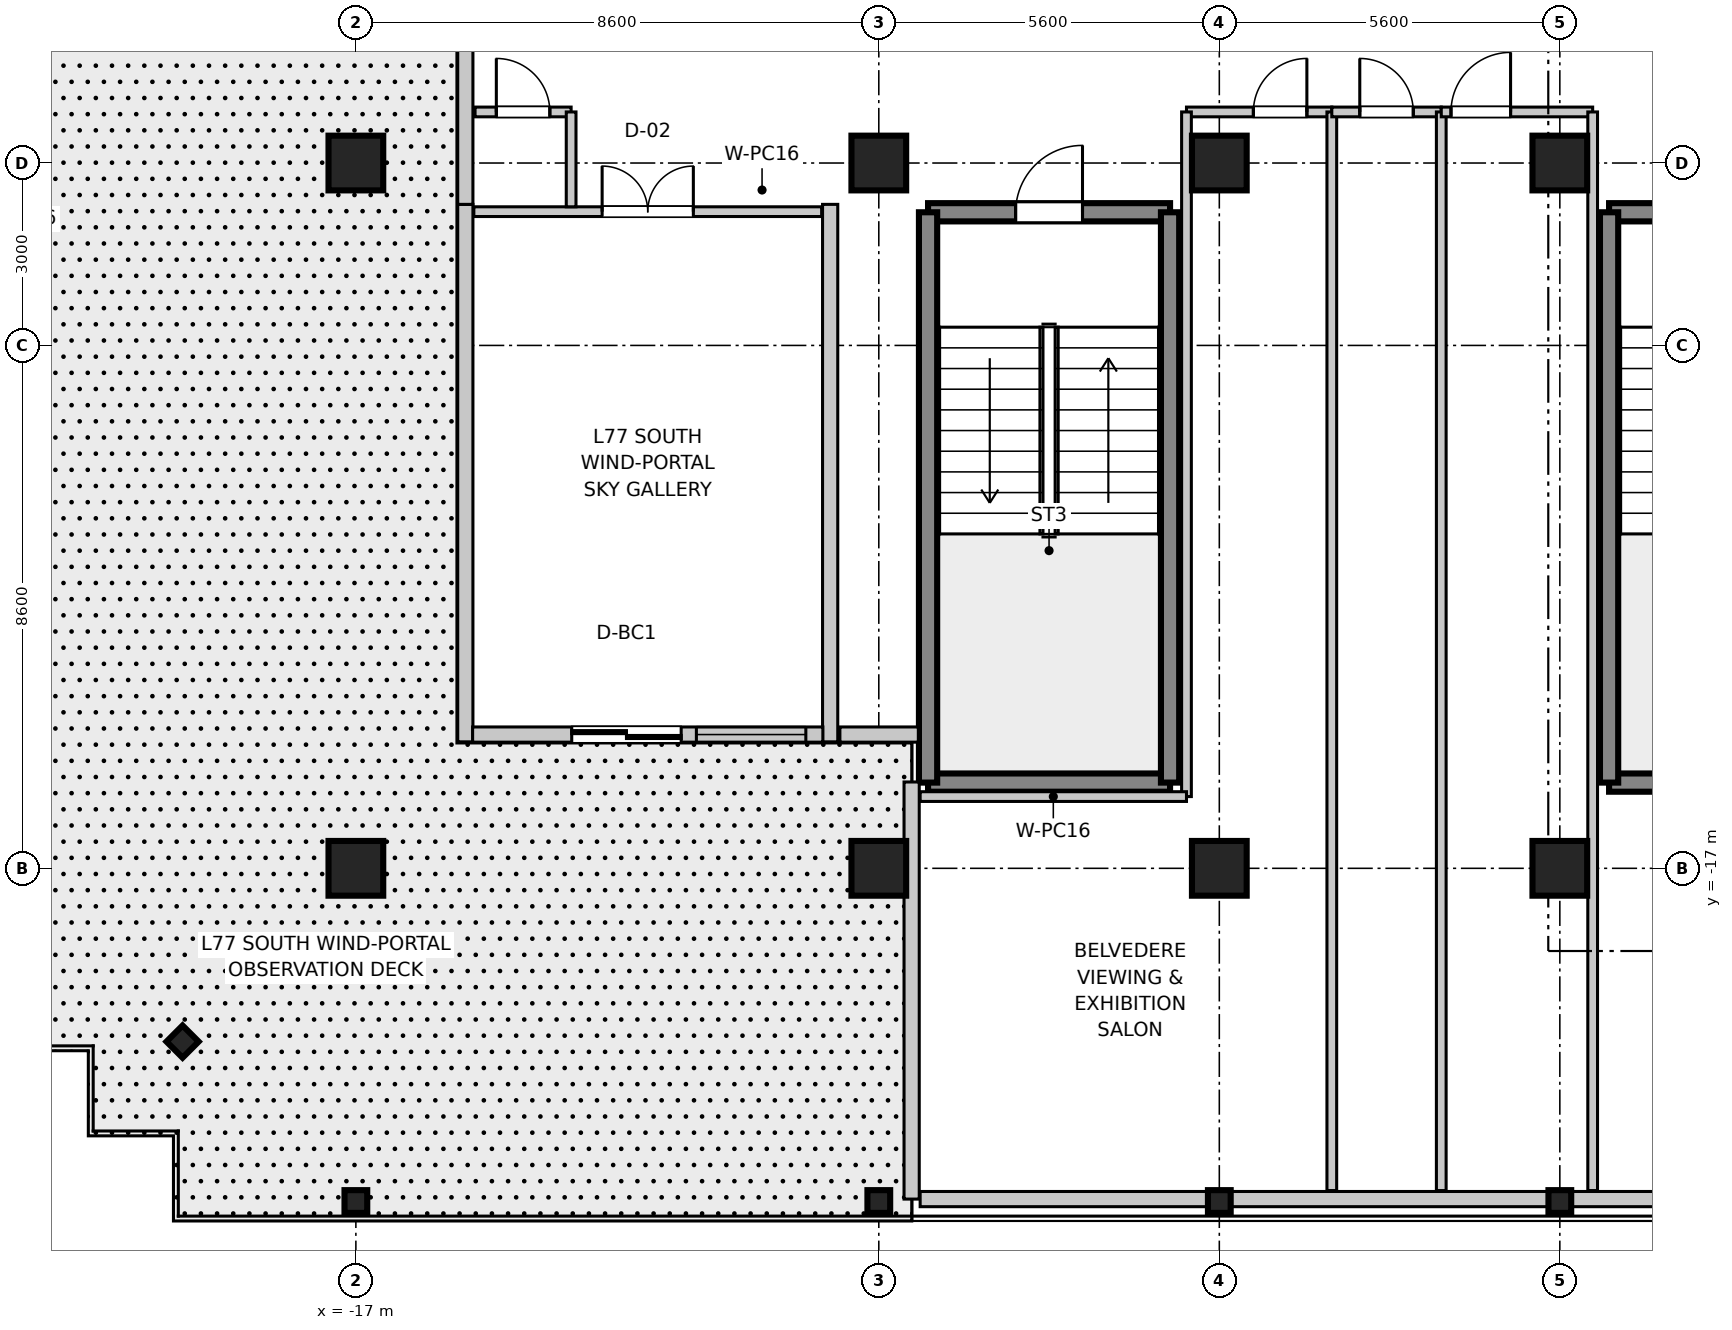
"""IFC4 building model, lengths in metres.
Left out: names, types, materials, properties, quantities, classifications, styles, units other than length and angle.
Written with IfcOpenShell. Run it as: python <this file> out.ifc"""

import sys

from ifc_helpers import new_model, si_unit, direction, frame, frame_2d, origin, origin_2d, place, context, subcontext, project, spatial, rectangle, i_section, extrude, source, transform, mapped, element, fill, save


model = new_model("IFC4")
c1 = context("Model", 3, precision=1e-05, world=origin(), true_north=direction((0.0, 1.0)))
c2 = subcontext(c1, "Body", "Model", "MODEL_VIEW")
j1 = project(units=[si_unit("LENGTHUNIT", "METRE"), si_unit("PLANEANGLEUNIT", "RADIAN")], contexts=[c1])
p1 = place(None, origin())
s1 = spatial("IfcSite", under=j1, at=p1, CompositionType="ELEMENT")
p2 = place(p1, origin())
s2 = spatial("IfcBuilding", under=s1, at=p2, CompositionType="ELEMENT")
p3 = place(p2, frame((0.0, 0.0, 300.35)))
s3 = spatial("IfcBuildingStorey", under=s2, at=p3, CompositionType="ELEMENT", Elevation=300.35)
m1 = source(origin(), c2, "Body", "SweptSolid", [
    extrude(rectangle(XDim=0.9, YDim=0.9, at=origin_2d()), origin(), (0.0, 0.0, 1.0), 3.805),
])
for number, where, z_axis, x_axis in (
    (1, (-17.0, -17.0, 0.0), (0.0, 0.0, 1.0), (1.0, 0.0, 0.0)),
    (2, (-17.0, -5.4, 0.0), (0.0, 0.0, 1.0), (1.0, 0.0, 0.0)),
    (3, (-8.4, -17.0, 0.0), (0.0, 0.0, 1.0), (1.0, 0.0, 0.0)),
    (4, (-8.4, -5.4, 0.0), (0.0, 0.0, 1.0), (1.0, 0.0, 0.0)),
    (5, (-2.8, -17.0, 0.0), (0.0, 0.0, 1.0), (1.0, 0.0, 0.0)),
    (6, (-2.8, -5.4, 0.0), (0.0, 0.0, 1.0), (1.0, 0.0, 0.0)),
    (7, (2.8, -17.0, 0.0), (0.0, 0.0, 1.0), (1.0, 0.0, 0.0)),
    (8, (2.8, -5.4, 0.0), (0.0, 0.0, 1.0), (1.0, 0.0, 0.0)),
):
    element("IfcColumn", number, at=place(p3, frame(where, z_axis=z_axis, x_axis=x_axis)), inside=s3, PredefinedType="COLUMN", context=c2, shape_type="MappedRepresentation", body=[
        mapped(m1, transform((0.0, 0.0, 0.0), scale=1.0)),
    ])
m2 = source(origin(), c2, "Body", "SweptSolid", [
    extrude(i_section(OverallWidth=0.374, OverallDepth=0.374, WebThickness=0.014, FlangeThickness=0.023, at=origin_2d()), origin(), (0.0, 0.0, 1.0), 3.805),
])
for number, where, z_axis, x_axis in (
    (9, (-17.0, -22.48, 0.0), (0.0, 0.0, 1.0), (0.0, 1.0, 0.0)),
    (10, (-8.4, -22.48, 0.0), (0.0, 0.0, 1.0), (0.0, 1.0, 0.0)),
    (11, (-2.8, -22.48, 0.0), (0.0, 0.0, 1.0), (0.0, 1.0, 0.0)),
    (12, (2.8, -22.48, 0.0), (0.0, 0.0, 1.0), (0.0, 1.0, 0.0)),
    (13, (-19.85, -19.85, 0.0), (0.0, 0.0, 1.0), (0.707, 0.707, 0.0)),
):
    element("IfcColumn", number, at=place(p3, frame(where, z_axis=z_axis, x_axis=x_axis)), inside=s3, PredefinedType="COLUMN", context=c2, shape_type="MappedRepresentation", body=[
        mapped(m2, transform((0.0, 0.0, 0.0), scale=1.0)),
    ])
m3 = source(origin(), c2, "Body", "SweptSolid", [
    extrude(rectangle(XDim=3.98, YDim=0.3, at=frame_2d((1.99, 0.0))), origin(), (0.0, 0.0, 1.0), 3.55),
])
p4 = place(p3, frame((3.61, -15.59, 0.0), z_axis=(0.0, 0.0, 1.0), x_axis=(1.0, 0.0, 0.0)))
e14 = element("IfcWall", 14, at=p4, inside=s3, PredefinedType="SHEAR", context=c2, shape_type="MappedRepresentation", body=[
    mapped(m3, transform((0.0, 0.0, 0.0), scale=1.0)),
])
p5 = place(p3, frame((3.61, -6.21, 0.0), z_axis=(0.0, 0.0, 1.0), x_axis=(1.0, 0.0, 0.0)))
e15 = element("IfcWall", 15, at=p5, inside=s3, PredefinedType="SHEAR", context=c2, shape_type="MappedRepresentation", body=[
    mapped(m3, transform((0.0, 0.0, 0.0), scale=1.0)),
])
p6 = place(p5, frame((1.44, 0.0, 0.0)))
e16 = element("IfcOpeningElement", 16, at=p6, cuts=e15, PredefinedType="OPENING", context=c2, shape_type="SweptSolid", body=[
    extrude(rectangle(XDim=1.1, YDim=2.15, at=frame_2d((0.55, 1.075))), frame((0.0, 0.16, 0.0), z_axis=(0.0, -1.0, 0.0), x_axis=(1.0, 0.0, 0.0)), (0.0, 0.0, 1.0), 0.32),
])
m4 = source(origin(), c2, "Body", "SweptSolid", [
    extrude(rectangle(XDim=9.38, YDim=0.3, at=frame_2d((4.69, 0.0))), origin(), (0.0, 0.0, 1.0), 3.55),
])
p7 = place(p3, frame((3.61, -15.59, 0.0), z_axis=(0.0, 0.0, 1.0), x_axis=(0.0, 1.0, 0.0)))
e17 = element("IfcWall", 17, at=p7, inside=s3, PredefinedType="SHEAR", context=c2, shape_type="MappedRepresentation", body=[
    mapped(m4, transform((0.0, 0.0, 0.0), scale=1.0)),
])
p8 = place(p3, frame((-7.59, -15.59, 0.0), z_axis=(0.0, 0.0, 1.0), x_axis=(1.0, 0.0, 0.0)))
e18 = element("IfcWall", 18, at=p8, inside=s3, PredefinedType="SHEAR", context=c2, shape_type="MappedRepresentation", body=[
    mapped(m3, transform((0.0, 0.0, 0.0), scale=1.0)),
])
p9 = place(p3, frame((-7.59, -6.21, 0.0), z_axis=(0.0, 0.0, 1.0), x_axis=(1.0, 0.0, 0.0)))
e19 = element("IfcWall", 19, at=p9, inside=s3, PredefinedType="SHEAR", context=c2, shape_type="MappedRepresentation", body=[
    mapped(m3, transform((0.0, 0.0, 0.0), scale=1.0)),
])
p10 = place(p9, frame((1.44, 0.0, 0.0)))
e20 = element("IfcOpeningElement", 20, at=p10, cuts=e19, PredefinedType="OPENING", context=c2, shape_type="SweptSolid", body=[
    extrude(rectangle(XDim=1.1, YDim=2.15, at=frame_2d((0.55, 1.075))), frame((0.0, 0.16, 0.0), z_axis=(0.0, -1.0, 0.0), x_axis=(1.0, 0.0, 0.0)), (0.0, 0.0, 1.0), 0.32),
])
for number, where, z_axis, x_axis in (
    (21, (-7.59, -15.59, 0.0), (0.0, 0.0, 1.0), (0.0, 1.0, 0.0)),
    (22, (-3.61, -15.59, 0.0), (0.0, 0.0, 1.0), (0.0, 1.0, 0.0)),
):
    element("IfcWall", number, at=place(p3, frame(where, z_axis=z_axis, x_axis=x_axis)), inside=s3, PredefinedType="SHEAR", context=c2, shape_type="MappedRepresentation", body=[
        mapped(m4, transform((0.0, 0.0, 0.0), scale=1.0)),
    ])
m5 = source(origin(), c2, "Body", "SweptSolid", [
    extrude(rectangle(XDim=8.84, YDim=0.25, at=frame_2d((4.42, 0.0))), origin(), (0.0, 0.0, 1.0), 2.99),
])
for number, where, z_axis, x_axis in (
    (23, (-15.2, -14.92, 0.0), (0.0, 0.0, 1.0), (0.0, 1.0, 0.0)),
    (24, (-9.2, -14.92, 0.0), (0.0, 0.0, 1.0), (0.0, 1.0, 0.0)),
):
    element("IfcWall", number, at=place(p3, frame(where, z_axis=z_axis, x_axis=x_axis)), inside=s3, PredefinedType="STANDARD", context=c2, shape_type="MappedRepresentation", body=[
        mapped(m5, transform((0.0, 0.0, 0.0), scale=1.0)),
    ])
m6 = source(origin(), c2, "Body", "SweptSolid", [
    extrude(rectangle(XDim=5.76, YDim=0.25, at=frame_2d((2.88, 0.0))), origin(), (0.0, 0.0, 1.0), 2.99),
])
p11 = place(p3, frame((-15.08, -14.8, 0.0), z_axis=(0.0, 0.0, 1.0), x_axis=(1.0, 0.0, 0.0)))
e25 = element("IfcWall", 25, at=p11, inside=s3, PredefinedType="STANDARD", context=c2, shape_type="MappedRepresentation", body=[
    mapped(m6, transform((0.0, 0.0, 0.0), scale=1.0)),
])
p12 = place(p11, frame((1.63, 0.0, 0.0)))
e26 = element("IfcOpeningElement", 26, at=p12, cuts=e25, PredefinedType="OPENING", context=c2, shape_type="SweptSolid", body=[
    extrude(rectangle(XDim=1.8, YDim=2.25, at=frame_2d((0.9, 1.125))), frame((0.0, 0.135, 0.0), z_axis=(0.0, -1.0, 0.0), x_axis=(1.0, 0.0, 0.0)), (0.0, 0.0, 1.0), 0.27),
])
p13 = place(p11, frame((3.68, 0.0, 0.85)))
e27 = element("IfcOpeningElement", 27, at=p13, cuts=e25, PredefinedType="OPENING", context=c2, shape_type="SweptSolid", body=[
    extrude(rectangle(XDim=1.8, YDim=1.5, at=frame_2d((0.9, 0.75))), frame((0.0, 0.135, 0.0), z_axis=(0.0, -1.0, 0.0), x_axis=(1.0, 0.0, 0.0)), (0.0, 0.0, 1.0), 0.27),
])
m7 = source(origin(), c2, "Body", "SweptSolid", [
    extrude(rectangle(XDim=2.72, YDim=0.25, at=frame_2d((1.36, 0.0))), origin(), (0.0, 0.0, 1.0), 2.89),
])
p14 = place(p3, frame((-15.2, -6.08, 0.0), z_axis=(0.0, 0.0, 1.0), x_axis=(0.0, 1.0, 0.0)))
e28 = element("IfcWall", 28, at=p14, inside=s3, PredefinedType="STANDARD", context=c2, shape_type="MappedRepresentation", body=[
    mapped(m7, transform((0.0, 0.0, 0.0), scale=1.0)),
])
m8 = source(origin(), c2, "Body", "SweptSolid", [
    extrude(rectangle(XDim=1.29, YDim=0.25, at=frame_2d((0.645, 0.0))), origin(), (0.0, 0.0, 1.0), 2.89),
])
p15 = place(p3, frame((-9.04, -14.8, 0.0), z_axis=(0.0, 0.0, 1.0), x_axis=(1.0, 0.0, 0.0)))
e29 = element("IfcWall", 29, at=p15, inside=s3, PredefinedType="STANDARD", context=c2, shape_type="MappedRepresentation", body=[
    mapped(m8, transform((0.0, 0.0, 0.0), scale=1.0)),
])
m9 = source(origin(), c2, "Body", "SweptSolid", [
    extrude(rectangle(XDim=6.86, YDim=0.25, at=frame_2d((3.43, 0.0))), origin(), (0.0, 0.0, 1.0), 2.89),
])
p16 = place(p3, frame((-7.86, -22.44, 0.0), z_axis=(0.0, 0.0, 1.0), x_axis=(0.0, 1.0, 0.0)))
e30 = element("IfcWall", 30, at=p16, inside=s3, PredefinedType="STANDARD", context=c2, shape_type="MappedRepresentation", body=[
    mapped(m9, transform((0.0, 0.0, 0.0), scale=1.0)),
])
m10 = source(origin(), c2, "Body", "SweptSolid", [
    extrude(rectangle(XDim=27.34, YDim=0.25, at=frame_2d((13.67, 0.0))), origin(), (0.0, 0.0, 1.0), 2.89),
])
p17 = place(p3, frame((-7.72, -22.44, 0.0), z_axis=(0.0, 0.0, 1.0), x_axis=(1.0, 0.0, 0.0)))
e31 = element("IfcWall", 31, at=p17, inside=s3, PredefinedType="STANDARD", context=c2, shape_type="MappedRepresentation", body=[
    mapped(m10, transform((0.0, 0.0, 0.0), scale=1.0)),
])
m11 = source(origin(), c2, "Body", "SweptSolid", [
    extrude(rectangle(XDim=5.72, YDim=0.16, at=frame_2d((2.86, 0.0))), origin(), (0.0, 0.0, 1.0), 2.89),
])
p18 = place(p3, frame((-15.06, -6.2, 0.0), z_axis=(0.0, 0.0, 1.0), x_axis=(1.0, 0.0, 0.0)))
e32 = element("IfcWall", 32, at=p18, inside=s3, PredefinedType="PARTITIONING", context=c2, shape_type="MappedRepresentation", body=[
    mapped(m11, transform((0.0, 0.0, 0.0), scale=1.0)),
])
p19 = place(p18, frame((2.11, 0.0, 0.0)))
e33 = element("IfcOpeningElement", 33, at=p19, cuts=e32, PredefinedType="OPENING", context=c2, shape_type="SweptSolid", body=[
    extrude(rectangle(XDim=1.5, YDim=2.15, at=frame_2d((0.75, 1.075))), frame((0.0, 0.09, 0.0), z_axis=(0.0, -1.0, 0.0), x_axis=(1.0, 0.0, 0.0)), (0.0, 0.0, 1.0), 0.18),
])
m12 = source(origin(), c2, "Body", "SweptSolid", [
    extrude(rectangle(XDim=1.58, YDim=0.16, at=frame_2d((0.79, 0.0))), origin(), (0.0, 0.0, 1.0), 2.89),
])
p20 = place(p3, frame((-15.04, -4.56, 0.0), z_axis=(0.0, 0.0, 1.0), x_axis=(1.0, 0.0, 0.0)))
e34 = element("IfcWall", 34, at=p20, inside=s3, PredefinedType="PARTITIONING", context=c2, shape_type="MappedRepresentation", body=[
    mapped(m12, transform((0.0, 0.0, 0.0), scale=1.0)),
])
p21 = place(p20, frame((0.35, 0.0, 0.0)))
e35 = element("IfcOpeningElement", 35, at=p21, cuts=e34, PredefinedType="OPENING", context=c2, shape_type="SweptSolid", body=[
    extrude(rectangle(XDim=0.88, YDim=2.1, at=frame_2d((0.44, 1.05))), frame((0.0, 0.09, 0.0), z_axis=(0.0, -1.0, 0.0), x_axis=(1.0, 0.0, 0.0)), (0.0, 0.0, 1.0), 0.18),
])
m13 = source(origin(), c2, "Body", "SweptSolid", [
    extrude(rectangle(XDim=1.56, YDim=0.16, at=frame_2d((0.78, 0.0))), origin(), (0.0, 0.0, 1.0), 2.89),
])
p22 = place(p3, frame((-13.46, -6.12, 0.0), z_axis=(0.0, 0.0, 1.0), x_axis=(0.0, 1.0, 0.0)))
e36 = element("IfcWall", 36, at=p22, inside=s3, PredefinedType="PARTITIONING", context=c2, shape_type="MappedRepresentation", body=[
    mapped(m13, transform((0.0, 0.0, 0.0), scale=1.0)),
])
m14 = source(origin(), c2, "Body", "SweptSolid", [
    extrude(rectangle(XDim=2.39, YDim=0.16, at=frame_2d((1.195, 0.0))), origin(), (0.0, 0.0, 1.0), 2.89),
])
p23 = place(p3, frame((-3.34, -4.56, 0.0), z_axis=(0.0, 0.0, 1.0), x_axis=(1.0, 0.0, 0.0)))
e37 = element("IfcWall", 37, at=p23, inside=s3, PredefinedType="PARTITIONING", context=c2, shape_type="MappedRepresentation", body=[
    mapped(m14, transform((0.0, 0.0, 0.0), scale=1.0)),
])
p24 = place(p23, frame((1.1, 0.0, 0.0)))
e38 = element("IfcOpeningElement", 38, at=p24, cuts=e37, PredefinedType="OPENING", context=c2, shape_type="SweptSolid", body=[
    extrude(rectangle(XDim=0.88, YDim=2.1, at=frame_2d((0.44, 1.05))), frame((0.0, 0.09, 0.0), z_axis=(0.0, -1.0, 0.0), x_axis=(1.0, 0.0, 0.0)), (0.0, 0.0, 1.0), 0.18),
])
m15 = source(origin(), c2, "Body", "SweptSolid", [
    extrude(rectangle(XDim=11.26, YDim=0.16, at=frame_2d((5.63, 0.0))), origin(), (0.0, 0.0, 1.0), 2.89),
])
p25 = place(p3, frame((-3.34, -15.82, 0.0), z_axis=(0.0, 0.0, 1.0), x_axis=(0.0, 1.0, 0.0)))
e39 = element("IfcWall", 39, at=p25, inside=s3, PredefinedType="PARTITIONING", context=c2, shape_type="MappedRepresentation", body=[
    mapped(m15, transform((0.0, 0.0, 0.0), scale=1.0)),
])
m16 = source(origin(), c2, "Body", "SweptSolid", [
    extrude(rectangle(XDim=4.38, YDim=0.16, at=frame_2d((2.19, 0.0))), origin(), (0.0, 0.0, 1.0), 2.89),
])
p26 = place(p3, frame((-7.72, -15.82, 0.0), z_axis=(0.0, 0.0, 1.0), x_axis=(1.0, 0.0, 0.0)))
e40 = element("IfcWall", 40, at=p26, inside=s3, PredefinedType="PARTITIONING", context=c2, shape_type="MappedRepresentation", body=[
    mapped(m16, transform((0.0, 0.0, 0.0), scale=1.0)),
])
m17 = source(origin(), c2, "Body", "SweptSolid", [
    extrude(rectangle(XDim=17.74, YDim=0.16, at=frame_2d((8.87, 0.0))), origin(), (0.0, 0.0, 1.0), 2.89),
])
p27 = place(p3, frame((-0.95, -22.3, 0.0), z_axis=(0.0, 0.0, 1.0), x_axis=(0.0, 1.0, 0.0)))
e41 = element("IfcWall", 41, at=p27, inside=s3, PredefinedType="PARTITIONING", context=c2, shape_type="MappedRepresentation", body=[
    mapped(m17, transform((0.0, 0.0, 0.0), scale=1.0)),
])
m18 = source(origin(), c2, "Body", "SweptSolid", [
    extrude(rectangle(XDim=1.8, YDim=0.16, at=frame_2d((0.9, 0.0))), origin(), (0.0, 0.0, 1.0), 2.89),
])
p28 = place(p3, frame((-0.95, -4.56, 0.0), z_axis=(0.0, 0.0, 1.0), x_axis=(1.0, 0.0, 0.0)))
e42 = element("IfcWall", 42, at=p28, inside=s3, PredefinedType="PARTITIONING", context=c2, shape_type="MappedRepresentation", body=[
    mapped(m18, transform((0.0, 0.0, 0.0), scale=1.0)),
])
p29 = place(p28, frame((0.46, 0.0, 0.0)))
e43 = element("IfcOpeningElement", 43, at=p29, cuts=e42, PredefinedType="OPENING", context=c2, shape_type="SweptSolid", body=[
    extrude(rectangle(XDim=0.88, YDim=2.1, at=frame_2d((0.44, 1.05))), frame((0.0, 0.09, 0.0), z_axis=(0.0, -1.0, 0.0), x_axis=(1.0, 0.0, 0.0)), (0.0, 0.0, 1.0), 0.18),
])
p30 = place(p3, frame((0.85, -22.3, 0.0), z_axis=(0.0, 0.0, 1.0), x_axis=(0.0, 1.0, 0.0)))
e44 = element("IfcWall", 44, at=p30, inside=s3, PredefinedType="PARTITIONING", context=c2, shape_type="MappedRepresentation", body=[
    mapped(m17, transform((0.0, 0.0, 0.0), scale=1.0)),
])
m19 = source(origin(), c2, "Body", "SweptSolid", [
    extrude(rectangle(XDim=2.49, YDim=0.16, at=frame_2d((1.245, 0.0))), origin(), (0.0, 0.0, 1.0), 2.89),
])
p31 = place(p3, frame((0.85, -4.56, 0.0), z_axis=(0.0, 0.0, 1.0), x_axis=(1.0, 0.0, 0.0)))
e45 = element("IfcWall", 45, at=p31, inside=s3, PredefinedType="PARTITIONING", context=c2, shape_type="MappedRepresentation", body=[
    mapped(m19, transform((0.0, 0.0, 0.0), scale=1.0)),
])
p32 = place(p31, frame((0.16, 0.0, 0.0)))
e46 = element("IfcOpeningElement", 46, at=p32, cuts=e45, PredefinedType="OPENING", context=c2, shape_type="SweptSolid", body=[
    extrude(rectangle(XDim=0.98, YDim=2.1, at=frame_2d((0.49, 1.05))), frame((0.0, 0.09, 0.0), z_axis=(0.0, -1.0, 0.0), x_axis=(1.0, 0.0, 0.0)), (0.0, 0.0, 1.0), 0.18),
])
p33 = place(p3, frame((3.34, -22.3, 0.0), z_axis=(0.0, 0.0, 1.0), x_axis=(0.0, 1.0, 0.0)))
e47 = element("IfcWall", 47, at=p33, inside=s3, PredefinedType="PARTITIONING", context=c2, shape_type="MappedRepresentation", body=[
    mapped(m17, transform((0.0, 0.0, 0.0), scale=1.0)),
])
m20 = source(origin(), c2, "Body", "SweptSolid", [
    extrude(rectangle(XDim=1.1, YDim=2.15, at=frame_2d((0.55, 1.075))), frame((0.0, 0.025, 0.0), z_axis=(0.0, -1.0, 0.0), x_axis=(1.0, 0.0, 0.0)), (0.0, 0.0, 1.0), 0.05),
])
p34 = place(p10, frame((1.1, 0.0, 0.0), z_axis=(0.0, 0.0, 1.0), x_axis=(-1.0, 0.0, 0.0)))
e48 = element("IfcDoor", 48, at=p34, inside=s3, OperationType="SINGLE_SWING_RIGHT", PredefinedType="DOOR", context=c2, shape_type="MappedRepresentation", body=[
    mapped(m20, transform((0.0, 0.0, 0.0), scale=1.0)),
])
fill(e20, e48)
m21 = source(origin(), c2, "Body", "SweptSolid", [
    extrude(rectangle(XDim=1.8, YDim=2.25, at=frame_2d((0.9, 1.125))), frame((0.0, 0.025, 0.0), z_axis=(0.0, -1.0, 0.0), x_axis=(1.0, 0.0, 0.0)), (0.0, 0.0, 1.0), 0.05),
])
p35 = place(p12, frame((1.8, 0.0, 0.0), z_axis=(0.0, 0.0, 1.0), x_axis=(-1.0, 0.0, 0.0)))
e49 = element("IfcDoor", 49, at=p35, inside=s3, OperationType="DOUBLE_DOOR_SLIDING", PredefinedType="DOOR", context=c2, shape_type="MappedRepresentation", body=[
    mapped(m21, transform((0.0, 0.0, 0.0), scale=1.0)),
])
fill(e26, e49)
m22 = source(origin(), c2, "Body", "SweptSolid", [
    extrude(rectangle(XDim=1.8, YDim=1.5, at=frame_2d((0.9, 0.75))), frame((0.0, 0.03, 0.0), z_axis=(0.0, -1.0, 0.0), x_axis=(1.0, 0.0, 0.0)), (0.0, 0.0, 1.0), 0.06),
])
p36 = place(p13, origin())
e50 = element("IfcWindow", 50, at=p36, inside=s3, PartitioningType="SINGLE_PANEL", PredefinedType="WINDOW", context=c2, shape_type="MappedRepresentation", body=[
    mapped(m22, transform((0.0, 0.0, 0.0), scale=1.0)),
])
fill(e27, e50)
m23 = source(origin(), c2, "Body", "SweptSolid", [
    extrude(rectangle(XDim=1.5, YDim=2.15, at=frame_2d((0.75, 1.075))), frame((0.0, 0.025, 0.0), z_axis=(0.0, -1.0, 0.0), x_axis=(1.0, 0.0, 0.0)), (0.0, 0.0, 1.0), 0.05),
])
p37 = place(p19, frame((1.5, 0.0, 0.0), z_axis=(0.0, 0.0, 1.0), x_axis=(-1.0, 0.0, 0.0)))
e51 = element("IfcDoor", 51, at=p37, inside=s3, OperationType="DOUBLE_DOOR_SINGLE_SWING", PredefinedType="DOOR", context=c2, shape_type="MappedRepresentation", body=[
    mapped(m23, transform((0.0, 0.0, 0.0), scale=1.0)),
])
fill(e33, e51)
m24 = source(origin(), c2, "Body", "SweptSolid", [
    extrude(rectangle(XDim=0.88, YDim=2.1, at=frame_2d((0.44, 1.05))), frame((0.0, 0.025, 0.0), z_axis=(0.0, -1.0, 0.0), x_axis=(1.0, 0.0, 0.0)), (0.0, 0.0, 1.0), 0.05),
])
p38 = place(p21, frame((0.88, 0.0, 0.0), z_axis=(0.0, 0.0, 1.0), x_axis=(-1.0, 0.0, 0.0)))
e52 = element("IfcDoor", 52, at=p38, inside=s3, OperationType="SINGLE_SWING_LEFT", PredefinedType="DOOR", context=c2, shape_type="MappedRepresentation", body=[
    mapped(m24, transform((0.0, 0.0, 0.0), scale=1.0)),
])
fill(e35, e52)
p39 = place(p24, frame((0.88, 0.0, 0.0), z_axis=(0.0, 0.0, 1.0), x_axis=(-1.0, 0.0, 0.0)))
e53 = element("IfcDoor", 53, at=p39, inside=s3, OperationType="SINGLE_SWING_RIGHT", PredefinedType="DOOR", context=c2, shape_type="MappedRepresentation", body=[
    mapped(m24, transform((0.0, 0.0, 0.0), scale=1.0)),
])
fill(e38, e53)
p40 = place(p29, frame((0.88, 0.0, 0.0), z_axis=(0.0, 0.0, 1.0), x_axis=(-1.0, 0.0, 0.0)))
e54 = element("IfcDoor", 54, at=p40, inside=s3, OperationType="SINGLE_SWING_LEFT", PredefinedType="DOOR", context=c2, shape_type="MappedRepresentation", body=[
    mapped(m24, transform((0.0, 0.0, 0.0), scale=1.0)),
])
fill(e43, e54)
m25 = source(origin(), c2, "Body", "SweptSolid", [
    extrude(rectangle(XDim=0.98, YDim=2.1, at=frame_2d((0.49, 1.05))), frame((0.0, 0.025, 0.0), z_axis=(0.0, -1.0, 0.0), x_axis=(1.0, 0.0, 0.0)), (0.0, 0.0, 1.0), 0.05),
])
p41 = place(p32, frame((0.98, 0.0, 0.0), z_axis=(0.0, 0.0, 1.0), x_axis=(-1.0, 0.0, 0.0)))
e55 = element("IfcDoor", 55, at=p41, inside=s3, OperationType="SINGLE_SWING_RIGHT", PredefinedType="DOOR", context=c2, shape_type="MappedRepresentation", body=[
    mapped(m25, transform((0.0, 0.0, 0.0), scale=1.0)),
])
fill(e46, e55)
save(model, sys.argv[1])
